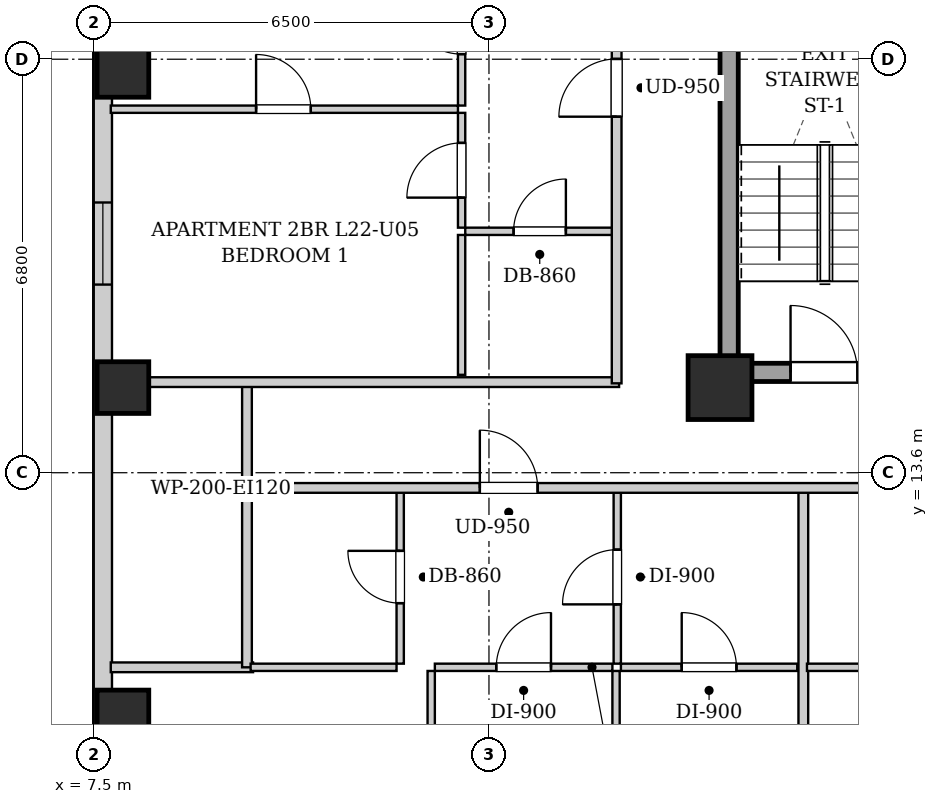
"""IFC4 building model, lengths in metres.
Left out: names, types, materials, properties, quantities, classifications, styles, units other than length and angle.
Written with IfcOpenShell. Run it as: python <this file> out.ifc"""

import sys

from ifc_helpers import new_model, si_unit, direction, frame, frame_2d, origin, origin_2d, place, context, subcontext, project, spatial, rectangle, extrude, element, fill, save


model = new_model("IFC4")
c1 = context("Model", 3, precision=1e-05, world=origin(), true_north=direction((0.0, 1.0)))
c2 = subcontext(c1, "Body", "Model", "MODEL_VIEW")
j1 = project(units=[si_unit("LENGTHUNIT", "METRE"), si_unit("PLANEANGLEUNIT", "RADIAN")], contexts=[c1])
p1 = place(None, origin())
s1 = spatial("IfcSite", under=j1, at=p1, CompositionType="ELEMENT")
p2 = place(p1, origin())
s2 = spatial("IfcBuilding", under=s1, at=p2, CompositionType="ELEMENT")
p3 = place(p2, frame((0.0, 0.0, 81.5)))
s3 = spatial("IfcBuildingStorey", under=s2, at=p3, CompositionType="ELEMENT", Elevation=81.5)
for number, where, z_axis, x_axis in (
    (1, (7.98, 9.6, 0.0), (0.0, 0.0, 1.0), (1.0, 0.0, 0.0)),
    (2, (7.98, 15.0, 0.0), (0.0, 0.0, 1.0), (1.0, 0.0, 0.0)),
    (3, (7.98, 20.2, 0.0), (0.0, 0.0, 1.0), (1.0, 0.0, 0.0)),
):
    element("IfcColumn", number, at=place(p3, frame(where, z_axis=z_axis, x_axis=x_axis)), inside=s3, PredefinedType="COLUMN", context=c2, shape_type="SweptSolid", body=[
        extrude(rectangle(XDim=0.85, YDim=0.85, at=origin_2d()), origin(), (0.0, 0.0, 1.0), 3.2),
    ])
p4 = place(p3, frame((17.8, 15.0, 0.0), z_axis=(0.0, 0.0, 1.0), x_axis=(1.0, 0.0, 0.0)))
e4 = element("IfcColumn", 4, at=p4, inside=s3, PredefinedType="COLUMN", context=c2, shape_type="SweptSolid", body=[
    extrude(rectangle(XDim=1.05, YDim=1.05, at=origin_2d()), origin(), (0.0, 0.0, 1.0), 3.2),
])
p5 = place(p3, frame((7.65, 2.5, 0.0), z_axis=(0.0, 0.0, 1.0), x_axis=(0.0, 1.0, 0.0)))
e5 = element("IfcWall", 5, at=p5, inside=s3, PredefinedType="SOLIDWALL", context=c2, shape_type="SweptSolid", body=[
    extrude(rectangle(XDim=38.3, YDim=0.3, at=frame_2d((19.15, 0.0))), origin(), (0.0, 0.0, 1.0), 2.94),
])
p6 = place(p5, frame((3.38, 0.0, 0.55)))
e6 = element("IfcOpeningElement", 6, at=p6, cuts=e5, PredefinedType="OPENING", context=c2, shape_type="SweptSolid", body=[
    extrude(rectangle(XDim=1.35, YDim=1.2, at=frame_2d((0.675, 0.6))), frame((0.0, 0.16, 0.0), z_axis=(0.0, -1.0, 0.0), x_axis=(1.0, 0.0, 0.0)), (0.0, 0.0, 1.0), 0.32),
])
p7 = place(p5, frame((1.135, 0.0, 0.55)))
e7 = element("IfcOpeningElement", 7, at=p7, cuts=e5, PredefinedType="OPENING", context=c2, shape_type="SweptSolid", body=[
    extrude(rectangle(XDim=1.35, YDim=1.2, at=frame_2d((0.675, 0.6))), frame((0.0, 0.16, 0.0), z_axis=(0.0, -1.0, 0.0), x_axis=(1.0, 0.0, 0.0)), (0.0, 0.0, 1.0), 0.32),
])
p8 = place(p5, frame((33.946, 0.0, 0.55)))
e8 = element("IfcOpeningElement", 8, at=p8, cuts=e5, PredefinedType="OPENING", context=c2, shape_type="SweptSolid", body=[
    extrude(rectangle(XDim=1.35, YDim=1.2, at=frame_2d((0.675, 0.6))), frame((0.0, 0.16, 0.0), z_axis=(0.0, -1.0, 0.0), x_axis=(1.0, 0.0, 0.0)), (0.0, 0.0, 1.0), 0.32),
])
p9 = place(p5, frame((32.085, 0.0, 0.55)))
e9 = element("IfcOpeningElement", 9, at=p9, cuts=e5, PredefinedType="OPENING", context=c2, shape_type="SweptSolid", body=[
    extrude(rectangle(XDim=1.35, YDim=1.2, at=frame_2d((0.675, 0.6))), frame((0.0, 0.16, 0.0), z_axis=(0.0, -1.0, 0.0), x_axis=(1.0, 0.0, 0.0)), (0.0, 0.0, 1.0), 0.32),
])
p10 = place(p5, frame((14.194, 0.0, 0.55)))
e10 = element("IfcOpeningElement", 10, at=p10, cuts=e5, PredefinedType="OPENING", context=c2, shape_type="SweptSolid", body=[
    extrude(rectangle(XDim=1.35, YDim=1.2, at=frame_2d((0.675, 0.6))), frame((0.0, 0.16, 0.0), z_axis=(0.0, -1.0, 0.0), x_axis=(1.0, 0.0, 0.0)), (0.0, 0.0, 1.0), 0.32),
])
p11 = place(p5, frame((23.582, 0.0, 0.55)))
e11 = element("IfcOpeningElement", 11, at=p11, cuts=e5, PredefinedType="OPENING", context=c2, shape_type="SweptSolid", body=[
    extrude(rectangle(XDim=1.35, YDim=1.2, at=frame_2d((0.675, 0.6))), frame((0.0, 0.16, 0.0), z_axis=(0.0, -1.0, 0.0), x_axis=(1.0, 0.0, 0.0)), (0.0, 0.0, 1.0), 0.32),
])
p12 = place(p3, frame((17.95, 15.1, 0.0), z_axis=(0.0, 0.0, 1.0), x_axis=(0.0, 1.0, 0.0)))
e12 = element("IfcWall", 12, at=p12, inside=s3, PredefinedType="SHEAR", context=c2, shape_type="SweptSolid", body=[
    extrude(rectangle(XDim=9.0, YDim=0.3, at=frame_2d((4.5, 0.0))), origin(), (0.0, 0.0, 1.0), 2.94),
])
p13 = place(p3, frame((18.1, 15.25, 0.0), z_axis=(0.0, 0.0, 1.0), x_axis=(1.0, 0.0, 0.0)))
e13 = element("IfcWall", 13, at=p13, inside=s3, PredefinedType="SHEAR", context=c2, shape_type="SweptSolid", body=[
    extrude(rectangle(XDim=2.85, YDim=0.3, at=frame_2d((1.425, 0.0))), origin(), (0.0, 0.0, 1.0), 2.94),
])
p14 = place(p13, frame((0.86, 0.0, 0.0)))
e14 = element("IfcOpeningElement", 14, at=p14, cuts=e13, PredefinedType="OPENING", context=c2, shape_type="SweptSolid", body=[
    extrude(rectangle(XDim=1.1, YDim=2.05, at=frame_2d((0.55, 1.025))), frame((0.0, 0.16, 0.0), z_axis=(0.0, -1.0, 0.0), x_axis=(1.0, 0.0, 0.0)), (0.0, 0.0, 1.0), 0.32),
])
p15 = place(p3, frame((10.02, 13.35, 0.0), z_axis=(0.0, 0.0, 1.0), x_axis=(0.0, 1.0, 0.0)))
e15 = element("IfcWall", 15, at=p15, inside=s3, PredefinedType="PARTITIONING", context=c2, shape_type="SweptSolid", body=[
    extrude(rectangle(XDim=1.74, YDim=0.16, at=frame_2d((0.87, 0.0))), origin(), (0.0, 0.0, 1.0), 2.94),
])
p16 = place(p3, frame((7.78, 15.09, 0.0), z_axis=(0.0, 0.0, 1.0), x_axis=(1.0, 0.0, 0.0)))
e16 = element("IfcWall", 16, at=p16, inside=s3, PredefinedType="PARTITIONING", context=c2, shape_type="SweptSolid", body=[
    extrude(rectangle(XDim=8.36, YDim=0.16, at=frame_2d((4.18, 0.0))), origin(), (0.0, 0.0, 1.0), 2.309),
])
p17 = place(p3, frame((7.78, 10.4, 0.0), z_axis=(0.0, 0.0, 1.0), x_axis=(1.0, 0.0, 0.0)))
e17 = element("IfcWall", 17, at=p17, inside=s3, PredefinedType="PARTITIONING", context=c2, shape_type="SweptSolid", body=[
    extrude(rectangle(XDim=2.34, YDim=0.16, at=frame_2d((1.17, 0.0))), origin(), (0.0, 0.0, 1.0), 2.94),
])
p18 = place(p3, frame((10.02, 10.4, 0.0), z_axis=(0.0, 0.0, 1.0), x_axis=(0.0, 1.0, 0.0)))
e18 = element("IfcWall", 18, at=p18, inside=s3, PredefinedType="PARTITIONING", context=c2, shape_type="SweptSolid", body=[
    extrude(rectangle(XDim=2.91, YDim=0.16, at=frame_2d((1.455, 0.0))), origin(), (0.0, 0.0, 1.0), 2.94),
])
p19 = place(p3, frame((12.54, 10.46, 0.0), z_axis=(0.0, 0.0, 1.0), x_axis=(0.0, 1.0, 0.0)))
e19 = element("IfcWall", 19, at=p19, inside=s3, PredefinedType="PARTITIONING", context=c2, shape_type="SweptSolid", body=[
    extrude(rectangle(XDim=2.85, YDim=0.12, at=frame_2d((1.425, 0.0))), origin(), (0.0, 0.0, 1.0), 2.94),
])
p20 = place(p19, frame((0.995, 0.0, 0.0)))
e20 = element("IfcOpeningElement", 20, at=p20, cuts=e19, PredefinedType="OPENING", context=c2, shape_type="SweptSolid", body=[
    extrude(rectangle(XDim=0.86, YDim=2.05, at=frame_2d((0.43, 1.025))), frame((0.0, 0.07, 0.0), z_axis=(0.0, -1.0, 0.0), x_axis=(1.0, 0.0, 0.0)), (0.0, 0.0, 1.0), 0.14),
])
p21 = place(p3, frame((10.08, 10.4, 0.0), z_axis=(0.0, 0.0, 1.0), x_axis=(1.0, 0.0, 0.0)))
e21 = element("IfcWall", 21, at=p21, inside=s3, PredefinedType="PARTITIONING", context=c2, shape_type="SweptSolid", body=[
    extrude(rectangle(XDim=2.4, YDim=0.12, at=frame_2d((1.2, 0.0))), origin(), (0.0, 0.0, 1.0), 2.94),
])
p22 = place(p3, frame((16.11, 10.46, 0.0), z_axis=(0.0, 0.0, 1.0), x_axis=(0.0, 1.0, 0.0)))
e22 = element("IfcWall", 22, at=p22, inside=s3, PredefinedType="PARTITIONING", context=c2, shape_type="SweptSolid", body=[
    extrude(rectangle(XDim=2.85, YDim=0.12, at=frame_2d((1.425, 0.0))), origin(), (0.0, 0.0, 1.0), 2.94),
])
p23 = place(p22, frame((0.975, 0.0, 0.0)))
e23 = element("IfcOpeningElement", 23, at=p23, cuts=e22, PredefinedType="OPENING", context=c2, shape_type="SweptSolid", body=[
    extrude(rectangle(XDim=0.9, YDim=2.05, at=frame_2d((0.45, 1.025))), frame((0.0, 0.07, 0.0), z_axis=(0.0, -1.0, 0.0), x_axis=(1.0, 0.0, 0.0)), (0.0, 0.0, 1.0), 0.14),
])
p24 = place(p3, frame((13.11, 10.4, 0.0), z_axis=(0.0, 0.0, 1.0), x_axis=(1.0, 0.0, 0.0)))
e24 = element("IfcWall", 24, at=p24, inside=s3, PredefinedType="PARTITIONING", context=c2, shape_type="SweptSolid", body=[
    extrude(rectangle(XDim=2.92, YDim=0.12, at=frame_2d((1.46, 0.0))), origin(), (0.0, 0.0, 1.0), 2.94),
])
p25 = place(p24, frame((1.01, 0.0, 0.0)))
e25 = element("IfcOpeningElement", 25, at=p25, cuts=e24, PredefinedType="OPENING", context=c2, shape_type="SweptSolid", body=[
    extrude(rectangle(XDim=0.9, YDim=2.05, at=frame_2d((0.45, 1.025))), frame((0.0, 0.07, 0.0), z_axis=(0.0, -1.0, 0.0), x_axis=(1.0, 0.0, 0.0)), (0.0, 0.0, 1.0), 0.14),
])
p26 = place(p3, frame((16.17, 10.4, 0.0), z_axis=(0.0, 0.0, 1.0), x_axis=(1.0, 0.0, 0.0)))
e26 = element("IfcWall", 26, at=p26, inside=s3, PredefinedType="PARTITIONING", context=c2, shape_type="SweptSolid", body=[
    extrude(rectangle(XDim=2.9, YDim=0.12, at=frame_2d((1.45, 0.0))), origin(), (0.0, 0.0, 1.0), 2.94),
])
p27 = place(p26, frame((1.0, 0.0, 0.0)))
e27 = element("IfcOpeningElement", 27, at=p27, cuts=e26, PredefinedType="OPENING", context=c2, shape_type="SweptSolid", body=[
    extrude(rectangle(XDim=0.9, YDim=2.05, at=frame_2d((0.45, 1.025))), frame((0.0, 0.07, 0.0), z_axis=(0.0, -1.0, 0.0), x_axis=(1.0, 0.0, 0.0)), (0.0, 0.0, 1.0), 0.14),
])
p28 = place(p3, frame((13.05, 2.43, 0.0), z_axis=(0.0, 0.0, 1.0), x_axis=(0.0, 1.0, 0.0)))
e28 = element("IfcWall", 28, at=p28, inside=s3, PredefinedType="PARTITIONING", context=c2, shape_type="SweptSolid", body=[
    extrude(rectangle(XDim=7.91, YDim=0.12, at=frame_2d((3.955, 0.0))), origin(), (0.0, 0.0, 1.0), 2.94),
])
p29 = place(p28, frame((3.505, 0.0, 0.0)))
e29 = element("IfcOpeningElement", 29, at=p29, cuts=e28, PredefinedType="OPENING", context=c2, shape_type="SweptSolid", body=[
    extrude(rectangle(XDim=0.9, YDim=2.05, at=frame_2d((0.45, 1.025))), frame((0.0, 0.07, 0.0), z_axis=(0.0, -1.0, 0.0), x_axis=(1.0, 0.0, 0.0)), (0.0, 0.0, 1.0), 0.14),
])
p30 = place(p3, frame((16.09, 2.43, 0.0), z_axis=(0.0, 0.0, 1.0), x_axis=(0.0, 1.0, 0.0)))
e30 = element("IfcWall", 30, at=p30, inside=s3, PredefinedType="PARTITIONING", context=c2, shape_type="SweptSolid", body=[
    extrude(rectangle(XDim=7.91, YDim=0.12, at=frame_2d((3.955, 0.0))), origin(), (0.0, 0.0, 1.0), 2.94),
])
p31 = place(p30, frame((3.505, 0.0, 0.0)))
e31 = element("IfcOpeningElement", 31, at=p31, cuts=e30, PredefinedType="OPENING", context=c2, shape_type="SweptSolid", body=[
    extrude(rectangle(XDim=0.9, YDim=2.05, at=frame_2d((0.45, 1.025))), frame((0.0, 0.07, 0.0), z_axis=(0.0, -1.0, 0.0), x_axis=(1.0, 0.0, 0.0)), (0.0, 0.0, 1.0), 0.14),
])
p32 = place(p3, frame((19.17, 0.28, 0.0), z_axis=(0.0, 0.0, 1.0), x_axis=(0.0, 1.0, 0.0)))
e32 = element("IfcWall", 32, at=p32, inside=s3, PredefinedType="PARTITIONING", context=c2, shape_type="SweptSolid", body=[
    extrude(rectangle(XDim=13.03, YDim=0.16, at=frame_2d((6.515, 0.0))), origin(), (0.0, 0.0, 1.0), 2.94),
])
p33 = place(p3, frame((19.23, 10.4, 0.0), z_axis=(0.0, 0.0, 1.0), x_axis=(1.0, 0.0, 0.0)))
e33 = element("IfcWall", 33, at=p33, inside=s3, PredefinedType="PARTITIONING", context=c2, shape_type="SweptSolid", body=[
    extrude(rectangle(XDim=2.4, YDim=0.12, at=frame_2d((1.2, 0.0))), origin(), (0.0, 0.0, 1.0), 2.94),
])
p34 = place(p3, frame((13.61, 17.57, 0.0), z_axis=(0.0, 0.0, 1.0), x_axis=(1.0, 0.0, 0.0)))
e34 = element("IfcWall", 34, at=p34, inside=s3, PredefinedType="PARTITIONING", context=c2, shape_type="SweptSolid", body=[
    extrude(rectangle(XDim=2.45, YDim=0.12, at=frame_2d((1.225, 0.0))), origin(), (0.0, 0.0, 1.0), 2.94),
])
p35 = place(p34, frame((0.795, 0.0, 0.0)))
e35 = element("IfcOpeningElement", 35, at=p35, cuts=e34, PredefinedType="OPENING", context=c2, shape_type="SweptSolid", body=[
    extrude(rectangle(XDim=0.86, YDim=2.05, at=frame_2d((0.43, 1.025))), frame((0.0, 0.07, 0.0), z_axis=(0.0, -1.0, 0.0), x_axis=(1.0, 0.0, 0.0)), (0.0, 0.0, 1.0), 0.14),
])
p36 = place(p3, frame((13.55, 15.21, 0.0), z_axis=(0.0, 0.0, 1.0), x_axis=(0.0, 1.0, 0.0)))
e36 = element("IfcWall", 36, at=p36, inside=s3, PredefinedType="PARTITIONING", context=c2, shape_type="SweptSolid", body=[
    extrude(rectangle(XDim=2.3, YDim=0.12, at=frame_2d((1.15, 0.0))), origin(), (0.0, 0.0, 1.0), 2.94),
])
p37 = place(p3, frame((13.55, 17.63, 0.0), z_axis=(0.0, 0.0, 1.0), x_axis=(0.0, 1.0, 0.0)))
e37 = element("IfcWall", 37, at=p37, inside=s3, PredefinedType="PARTITIONING", context=c2, shape_type="SweptSolid", body=[
    extrude(rectangle(XDim=1.888, YDim=0.12, at=frame_2d((0.944, 0.0))), origin(), (0.0, 0.0, 1.0), 2.94),
])
p38 = place(p37, frame((0.494, 0.0, 0.0)))
e38 = element("IfcOpeningElement", 38, at=p38, cuts=e37, PredefinedType="OPENING", context=c2, shape_type="SweptSolid", body=[
    extrude(rectangle(XDim=0.9, YDim=2.05, at=frame_2d((0.45, 1.025))), frame((0.0, 0.07, 0.0), z_axis=(0.0, -1.0, 0.0), x_axis=(1.0, 0.0, 0.0)), (0.0, 0.0, 1.0), 0.14),
])
p39 = place(p3, frame((13.55, 19.638, 0.0), z_axis=(0.0, 0.0, 1.0), x_axis=(0.0, 1.0, 0.0)))
e39 = element("IfcWall", 39, at=p39, inside=s3, PredefinedType="PARTITIONING", context=c2, shape_type="SweptSolid", body=[
    extrude(rectangle(XDim=2.592, YDim=0.12, at=frame_2d((1.296, 0.0))), origin(), (0.0, 0.0, 1.0), 2.94),
])
p40 = place(p39, frame((0.846, 0.0, 0.0)))
e40 = element("IfcOpeningElement", 40, at=p40, cuts=e39, PredefinedType="OPENING", context=c2, shape_type="SweptSolid", body=[
    extrude(rectangle(XDim=0.9, YDim=2.05, at=frame_2d((0.45, 1.025))), frame((0.0, 0.07, 0.0), z_axis=(0.0, -1.0, 0.0), x_axis=(1.0, 0.0, 0.0)), (0.0, 0.0, 1.0), 0.14),
])
p41 = place(p3, frame((7.78, 19.578, 0.0), z_axis=(0.0, 0.0, 1.0), x_axis=(1.0, 0.0, 0.0)))
e41 = element("IfcWall", 41, at=p41, inside=s3, PredefinedType="PARTITIONING", context=c2, shape_type="SweptSolid", body=[
    extrude(rectangle(XDim=5.71, YDim=0.12, at=frame_2d((2.855, 0.0))), origin(), (0.0, 0.0, 1.0), 2.94),
])
p42 = place(p41, frame((2.39, 0.0, 0.0)))
e42 = element("IfcOpeningElement", 42, at=p42, cuts=e41, PredefinedType="OPENING", context=c2, shape_type="SweptSolid", body=[
    extrude(rectangle(XDim=0.9, YDim=2.05, at=frame_2d((0.45, 1.025))), frame((0.0, 0.07, 0.0), z_axis=(0.0, -1.0, 0.0), x_axis=(1.0, 0.0, 0.0)), (0.0, 0.0, 1.0), 0.14),
])
p43 = place(p3, frame((10.05, 13.35, 0.0), z_axis=(0.0, 0.0, 1.0), x_axis=(1.0, 0.0, 0.0)))
e43 = element("IfcWall", 43, at=p43, inside=s3, PredefinedType="PARTITIONING", context=c2, shape_type="SweptSolid", body=[
    extrude(rectangle(XDim=30.8, YDim=0.16, at=frame_2d((15.4, 0.0))), origin(), (0.0, 0.0, 1.0), 2.94),
])
p44 = place(p43, frame((3.8, 0.0, 0.0)))
e44 = element("IfcOpeningElement", 44, at=p44, cuts=e43, PredefinedType="OPENING", context=c2, shape_type="SweptSolid", body=[
    extrude(rectangle(XDim=0.95, YDim=2.1, at=frame_2d((0.475, 1.05))), frame((0.0, 0.09, 0.0), z_axis=(0.0, -1.0, 0.0), x_axis=(1.0, 0.0, 0.0)), (0.0, 0.0, 1.0), 0.18),
])
p45 = place(p43, frame((13.445, 0.0, 0.0)))
e45 = element("IfcOpeningElement", 45, at=p45, cuts=e43, PredefinedType="OPENING", context=c2, shape_type="SweptSolid", body=[
    extrude(rectangle(XDim=0.95, YDim=2.1, at=frame_2d((0.475, 1.05))), frame((0.0, 0.09, 0.0), z_axis=(0.0, -1.0, 0.0), x_axis=(1.0, 0.0, 0.0)), (0.0, 0.0, 1.0), 0.18),
])
p46 = place(p3, frame((16.1, 15.07, 0.0), z_axis=(0.0, 0.0, 1.0), x_axis=(0.0, 1.0, 0.0)))
e46 = element("IfcWall", 46, at=p46, inside=s3, PredefinedType="PARTITIONING", context=c2, shape_type="SweptSolid", body=[
    extrude(rectangle(XDim=13.93, YDim=0.16, at=frame_2d((6.965, 0.0))), origin(), (0.0, 0.0, 1.0), 2.94),
])
p47 = place(p46, frame((4.385, 0.0, 0.0)))
e47 = element("IfcOpeningElement", 47, at=p47, cuts=e46, PredefinedType="OPENING", context=c2, shape_type="SweptSolid", body=[
    extrude(rectangle(XDim=0.95, YDim=2.1, at=frame_2d((0.475, 1.05))), frame((0.0, 0.09, 0.0), z_axis=(0.0, -1.0, 0.0), x_axis=(1.0, 0.0, 0.0)), (0.0, 0.0, 1.0), 0.18),
])
p48 = place(p14, origin())
e48 = element("IfcDoor", 48, at=p48, inside=s3, OperationType="SINGLE_SWING_LEFT", PredefinedType="DOOR", context=c2, shape_type="SweptSolid", body=[
    extrude(rectangle(XDim=1.1, YDim=2.05, at=frame_2d((0.55, 1.025))), frame((0.0, 0.025, 0.0), z_axis=(0.0, -1.0, 0.0), x_axis=(1.0, 0.0, 0.0)), (0.0, 0.0, 1.0), 0.05),
])
fill(e14, e48)
p49 = place(p20, origin())
e49 = element("IfcDoor", 49, at=p49, inside=s3, OperationType="SINGLE_SWING_RIGHT", PredefinedType="DOOR", context=c2, shape_type="SweptSolid", body=[
    extrude(rectangle(XDim=0.86, YDim=2.05, at=frame_2d((0.43, 1.025))), frame((0.0, 0.025, 0.0), z_axis=(0.0, -1.0, 0.0), x_axis=(1.0, 0.0, 0.0)), (0.0, 0.0, 1.0), 0.05),
])
fill(e20, e49)
p50 = place(p23, origin())
e50 = element("IfcDoor", 50, at=p50, inside=s3, OperationType="SINGLE_SWING_LEFT", PredefinedType="DOOR", context=c2, shape_type="SweptSolid", body=[
    extrude(rectangle(XDim=0.9, YDim=2.05, at=frame_2d((0.45, 1.025))), frame((0.0, 0.025, 0.0), z_axis=(0.0, -1.0, 0.0), x_axis=(1.0, 0.0, 0.0)), (0.0, 0.0, 1.0), 0.05),
])
fill(e23, e50)
p51 = place(p25, origin())
e51 = element("IfcDoor", 51, at=p51, inside=s3, OperationType="SINGLE_SWING_RIGHT", PredefinedType="DOOR", context=c2, shape_type="SweptSolid", body=[
    extrude(rectangle(XDim=0.9, YDim=2.05, at=frame_2d((0.45, 1.025))), frame((0.0, 0.025, 0.0), z_axis=(0.0, -1.0, 0.0), x_axis=(1.0, 0.0, 0.0)), (0.0, 0.0, 1.0), 0.05),
])
fill(e25, e51)
p52 = place(p27, origin())
e52 = element("IfcDoor", 52, at=p52, inside=s3, OperationType="SINGLE_SWING_LEFT", PredefinedType="DOOR", context=c2, shape_type="SweptSolid", body=[
    extrude(rectangle(XDim=0.9, YDim=2.05, at=frame_2d((0.45, 1.025))), frame((0.0, 0.025, 0.0), z_axis=(0.0, -1.0, 0.0), x_axis=(1.0, 0.0, 0.0)), (0.0, 0.0, 1.0), 0.05),
])
fill(e27, e52)
p53 = place(p35, origin())
e53 = element("IfcDoor", 53, at=p53, inside=s3, OperationType="SINGLE_SWING_RIGHT", PredefinedType="DOOR", context=c2, shape_type="SweptSolid", body=[
    extrude(rectangle(XDim=0.86, YDim=2.05, at=frame_2d((0.43, 1.025))), frame((0.0, 0.025, 0.0), z_axis=(0.0, -1.0, 0.0), x_axis=(1.0, 0.0, 0.0)), (0.0, 0.0, 1.0), 0.05),
])
fill(e35, e53)
p54 = place(p38, origin())
e54 = element("IfcDoor", 54, at=p54, inside=s3, OperationType="SINGLE_SWING_LEFT", PredefinedType="DOOR", context=c2, shape_type="SweptSolid", body=[
    extrude(rectangle(XDim=0.9, YDim=2.05, at=frame_2d((0.45, 1.025))), frame((0.0, 0.025, 0.0), z_axis=(0.0, -1.0, 0.0), x_axis=(1.0, 0.0, 0.0)), (0.0, 0.0, 1.0), 0.05),
])
fill(e38, e54)
p55 = place(p40, origin())
e55 = element("IfcDoor", 55, at=p55, inside=s3, OperationType="SINGLE_SWING_RIGHT", PredefinedType="DOOR", context=c2, shape_type="SweptSolid", body=[
    extrude(rectangle(XDim=0.9, YDim=2.05, at=frame_2d((0.45, 1.025))), frame((0.0, 0.025, 0.0), z_axis=(0.0, -1.0, 0.0), x_axis=(1.0, 0.0, 0.0)), (0.0, 0.0, 1.0), 0.05),
])
fill(e40, e55)
p56 = place(p42, origin())
e56 = element("IfcDoor", 56, at=p56, inside=s3, OperationType="SINGLE_SWING_LEFT", PredefinedType="DOOR", context=c2, shape_type="SweptSolid", body=[
    extrude(rectangle(XDim=0.9, YDim=2.05, at=frame_2d((0.45, 1.025))), frame((0.0, 0.025, 0.0), z_axis=(0.0, -1.0, 0.0), x_axis=(1.0, 0.0, 0.0)), (0.0, 0.0, 1.0), 0.05),
])
fill(e42, e56)
p57 = place(p44, origin())
e57 = element("IfcDoor", 57, at=p57, inside=s3, OperationType="SINGLE_SWING_LEFT", PredefinedType="DOOR", context=c2, shape_type="SweptSolid", body=[
    extrude(rectangle(XDim=0.95, YDim=2.1, at=frame_2d((0.475, 1.05))), frame((0.0, 0.025, 0.0), z_axis=(0.0, -1.0, 0.0), x_axis=(1.0, 0.0, 0.0)), (0.0, 0.0, 1.0), 0.05),
])
fill(e44, e57)
p58 = place(p47, origin())
e58 = element("IfcDoor", 58, at=p58, inside=s3, OperationType="SINGLE_SWING_LEFT", PredefinedType="DOOR", context=c2, shape_type="SweptSolid", body=[
    extrude(rectangle(XDim=0.95, YDim=2.1, at=frame_2d((0.475, 1.05))), frame((0.0, 0.025, 0.0), z_axis=(0.0, -1.0, 0.0), x_axis=(1.0, 0.0, 0.0)), (0.0, 0.0, 1.0), 0.05),
])
fill(e47, e58)
p59 = place(p10, origin())
e59 = element("IfcWindow", 59, at=p59, inside=s3, PartitioningType="SINGLE_PANEL", PredefinedType="WINDOW", context=c2, shape_type="SweptSolid", body=[
    extrude(rectangle(XDim=1.35, YDim=1.2, at=frame_2d((0.675, 0.6))), frame((0.0, 0.03, 0.0), z_axis=(0.0, -1.0, 0.0), x_axis=(1.0, 0.0, 0.0)), (0.0, 0.0, 1.0), 0.06),
])
fill(e10, e59)
save(model, sys.argv[1])
